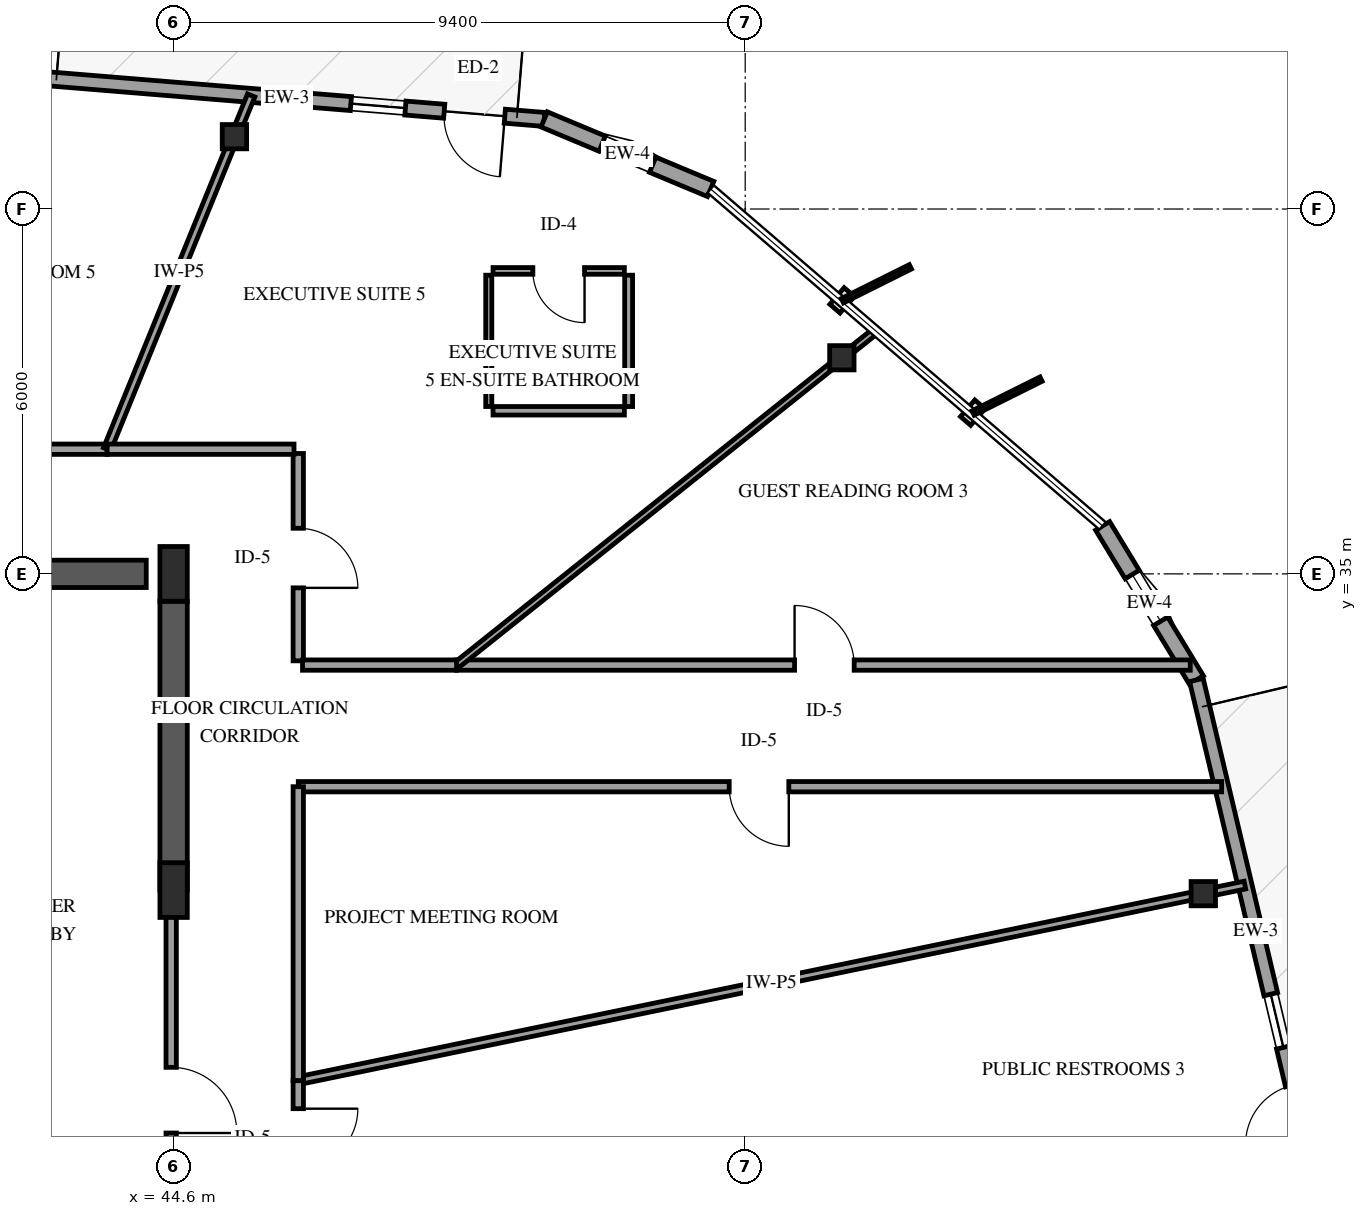
"""IFC4 building model, lengths in metres.
Left out: names, types, materials, properties, quantities, classifications, styles, units other than length and angle.
Written with IfcOpenShell. Run it as: python <this file> out.ifc"""

import sys

from ifc_helpers import new_model, si_unit, direction, frame, frame_2d, origin, origin_2d, place, context, subcontext, project, spatial, rectangle, i_section, extrude, element, fill, save


model = new_model("IFC4")
c1 = context("Model", 3, precision=1e-05, world=origin(), true_north=direction((0.0, 1.0)))
c2 = subcontext(c1, "Body", "Model", "MODEL_VIEW")
j1 = project(units=[si_unit("LENGTHUNIT", "METRE"), si_unit("PLANEANGLEUNIT", "RADIAN")], contexts=[c1])
p1 = place(None, origin())
s1 = spatial("IfcSite", under=j1, at=p1, CompositionType="ELEMENT")
p2 = place(p1, origin())
s2 = spatial("IfcBuilding", under=s1, at=p2, CompositionType="ELEMENT")
p3 = place(p2, frame((0.0, 0.0, 280.0)))
s3 = spatial("IfcBuildingStorey", under=s2, at=p3, CompositionType="ELEMENT", Elevation=280.0)
p4 = place(p3, frame((41.3, 35.0, 0.0), z_axis=(0.0, 0.0, 1.0), x_axis=(1.0, 0.0, 0.0)))
e1 = element("IfcWall", 1, at=p4, inside=s3, PredefinedType="SHEAR", context=c2, shape_type="SweptSolid", body=[
    extrude(rectangle(XDim=2.85, YDim=0.45, at=frame_2d((1.425, 0.0))), origin(), (0.0, 0.0, 1.0), 3.75),
])
p5 = place(p3, frame((44.6, 29.8, 0.0), z_axis=(0.0, 0.0, 1.0), x_axis=(0.0, 1.0, 0.0)))
e2 = element("IfcWall", 2, at=p5, inside=s3, PredefinedType="SHEAR", context=c2, shape_type="SweptSolid", body=[
    extrude(rectangle(XDim=4.75, YDim=0.45, at=frame_2d((2.375, 0.0))), origin(), (0.0, 0.0, 1.0), 3.75),
])
for number, where, z_axis, x_axis in (
    (3, (44.6, 29.8, 0.0), (0.0, 0.0, 1.0), (1.0, 0.0, 0.0)),
    (4, (44.6, 35.0, 0.0), (0.0, 0.0, 1.0), (1.0, 0.0, 0.0)),
):
    element("IfcColumn", number, at=place(p3, frame(where, z_axis=z_axis, x_axis=x_axis)), inside=s3, PredefinedType="PILASTER", context=c2, shape_type="SweptSolid", body=[
        extrude(rectangle(XDim=0.45, YDim=0.9, at=origin_2d()), origin(), (0.0, 0.0, 1.0), 3.75),
    ])
for number, where, z_axis, x_axis in (
    (5, (61.534, 29.741, 0.0), (0.0, 0.0, 1.0), (1.0, 0.0, 0.0)),
    (6, (55.589, 38.554, 0.0), (0.0, 0.0, 1.0), (1.0, 0.0, 0.0)),
    (7, (45.6, 42.189, 0.0), (0.0, 0.0, 1.0), (1.0, 0.0, 0.0)),
):
    element("IfcColumn", number, at=place(p3, frame(where, z_axis=z_axis, x_axis=x_axis)), inside=s3, PredefinedType="COLUMN", context=c2, shape_type="SweptSolid", body=[
        extrude(i_section(OverallWidth=0.401, OverallDepth=0.399, WebThickness=0.025, FlangeThickness=0.04, FilletRadius=0.038, at=origin_2d()), origin(), (0.0, 0.0, 1.0), 3.75),
    ])
p6 = place(p3, frame((50.695, 42.473, 0.0), z_axis=(0.0, 0.0, 1.0), x_axis=(-0.996664954759, 0.081602499682, 0.0)))
e8 = element("IfcWall", 8, at=p6, inside=s3, PredefinedType="SOLIDWALL", context=c2, shape_type="SweptSolid", body=[
    extrude(rectangle(XDim=8.5, YDim=0.23, at=frame_2d((4.25, 0.0))), origin(), (0.0, 0.0, 1.0), 2.789),
])
p7 = place(p6, frame((0.65, 0.0, 0.0)))
e9 = element("IfcOpeningElement", 9, at=p7, cuts=e8, PredefinedType="OPENING", context=c2, shape_type="SweptSolid", body=[
    extrude(rectangle(XDim=1.0, YDim=2.15, at=frame_2d((0.5, 1.075))), frame((0.0, 0.125, 0.0), z_axis=(0.0, -1.0, 0.0), x_axis=(1.0, 0.0, 0.0)), (0.0, 0.0, 1.0), 0.25),
])
p8 = place(p6, frame((2.29, 0.0, 0.72)))
e10 = element("IfcOpeningElement", 10, at=p8, cuts=e8, PredefinedType="OPENING", context=c2, shape_type="SweptSolid", body=[
    extrude(rectangle(XDim=0.9, YDim=1.5, at=frame_2d((0.45, 0.75))), frame((0.0, 0.125, 0.0), z_axis=(0.0, -1.0, 0.0), x_axis=(1.0, 0.0, 0.0)), (0.0, 0.0, 1.0), 0.25),
])
p9 = place(p3, frame((61.42, 33.255, 0.0), z_axis=(0.0, 0.0, 1.0), x_axis=(-0.51977462781, 0.854303421675, 0.0)))
e11 = element("IfcWall", 11, at=p9, inside=s3, PredefinedType="SOLIDWALL", context=c2, shape_type="SweptSolid", body=[
    extrude(rectangle(XDim=2.967, YDim=0.27, at=frame_2d((1.483, 0.0))), origin(), (0.0, 0.0, 1.0), 2.789),
])
p10 = place(p9, frame((1.131, 0.0, 0.75)))
e12 = element("IfcOpeningElement", 12, at=p10, cuts=e11, PredefinedType="OPENING", context=c2, shape_type="SweptSolid", body=[
    extrude(rectangle(XDim=0.9, YDim=1.5, at=frame_2d((0.45, 0.75))), frame((0.0, 0.145, 0.0), z_axis=(0.0, -1.0, 0.0), x_axis=(1.0, 0.0, 0.0)), (0.0, 0.0, 1.0), 0.29),
])
p11 = place(p3, frame((63.378, 24.984, 0.0), z_axis=(0.0, 0.0, 1.0), x_axis=(-0.230391946718, 0.973097914337, 0.0)))
e13 = element("IfcWall", 13, at=p11, inside=s3, PredefinedType="SOLIDWALL", context=c2, shape_type="SweptSolid", body=[
    extrude(rectangle(XDim=8.5, YDim=0.23, at=frame_2d((4.25, 0.0))), origin(), (0.0, 0.0, 1.0), 2.789),
])
p12 = place(p11, frame((0.65, 0.0, 0.0)))
e14 = element("IfcOpeningElement", 14, at=p12, cuts=e13, PredefinedType="OPENING", context=c2, shape_type="SweptSolid", body=[
    extrude(rectangle(XDim=1.0, YDim=2.15, at=frame_2d((0.5, 1.075))), frame((0.0, 0.125, 0.0), z_axis=(0.0, -1.0, 0.0), x_axis=(1.0, 0.0, 0.0)), (0.0, 0.0, 1.0), 0.25),
])
p13 = place(p11, frame((2.29, 0.0, 0.72)))
e15 = element("IfcOpeningElement", 15, at=p13, cuts=e13, PredefinedType="OPENING", context=c2, shape_type="SweptSolid", body=[
    extrude(rectangle(XDim=0.9, YDim=1.5, at=frame_2d((0.45, 0.75))), frame((0.0, 0.125, 0.0), z_axis=(0.0, -1.0, 0.0), x_axis=(1.0, 0.0, 0.0)), (0.0, 0.0, 1.0), 0.25),
])
p14 = place(p3, frame((53.432, 41.33, 0.0), z_axis=(0.0, 0.0, 1.0), x_axis=(-0.922674655035, 0.385579409405, 0.0)))
e16 = element("IfcWall", 16, at=p14, inside=s3, PredefinedType="SOLIDWALL", context=c2, shape_type="SweptSolid", body=[
    extrude(rectangle(XDim=2.967, YDim=0.27, at=frame_2d((1.483, 0.0))), origin(), (0.0, 0.0, 1.0), 2.789),
])
p15 = place(p14, frame((1.033, 0.0, 0.75)))
e17 = element("IfcOpeningElement", 17, at=p15, cuts=e16, PredefinedType="OPENING", context=c2, shape_type="SweptSolid", body=[
    extrude(rectangle(XDim=0.9, YDim=1.5, at=frame_2d((0.45, 0.75))), frame((0.0, 0.145, 0.0), z_axis=(0.0, -1.0, 0.0), x_axis=(1.0, 0.0, 0.0)), (0.0, 0.0, 1.0), 0.29),
])
p16 = place(p3, frame((46.65, 26.665, 0.0), z_axis=(0.0, 0.0, 1.0), x_axis=(0.97930966803, 0.202367423521, 0.0)))
e18 = element("IfcWall", 18, at=p16, inside=s3, PredefinedType="PARTITIONING", context=c2, shape_type="SweptSolid", body=[
    extrude(rectangle(XDim=15.897, YDim=0.13, at=frame_2d((7.948, 0.0))), origin(), (0.0, 0.0, 1.0), 2.705),
])
p17 = place(p3, frame((61.835, 31.5, 0.0), z_axis=(0.0, 0.0, 1.0), x_axis=(-1.0, 0.0, 0.0)))
e19 = element("IfcWall", 19, at=p17, inside=s3, PredefinedType="PARTITIONING", context=c2, shape_type="SweptSolid", body=[
    extrude(rectangle(XDim=15.185, YDim=0.17, at=frame_2d((7.593, 0.0))), origin(), (0.0, 0.0, 1.0), 3.41),
])
p18 = place(p17, frame((7.118, 0.0, 0.0)))
e20 = element("IfcOpeningElement", 20, at=p18, cuts=e19, PredefinedType="OPENING", context=c2, shape_type="SweptSolid", body=[
    extrude(rectangle(XDim=0.98, YDim=2.15, at=frame_2d((0.49, 1.075))), frame((0.0, 0.095, 0.0), z_axis=(0.0, -1.0, 0.0), x_axis=(1.0, 0.0, 0.0)), (0.0, 0.0, 1.0), 0.19),
])
p19 = place(p3, frame((30.903, 37.05, 0.0), z_axis=(0.0, 0.0, 1.0), x_axis=(1.0, 0.0, 0.0)))
e21 = element("IfcWall", 21, at=p19, inside=s3, PredefinedType="PARTITIONING", context=c2, shape_type="SweptSolid", body=[
    extrude(rectangle(XDim=12.604, YDim=0.17, at=frame_2d((6.302, 0.0))), origin(), (0.0, 0.0, 1.0), 3.41),
])
p20 = place(p19, frame((5.827, 0.0, 0.0)))
e22 = element("IfcOpeningElement", 22, at=p20, cuts=e21, PredefinedType="OPENING", context=c2, shape_type="SweptSolid", body=[
    extrude(rectangle(XDim=0.98, YDim=2.15, at=frame_2d((0.49, 1.075))), frame((0.0, 0.095, 0.0), z_axis=(0.0, -1.0, 0.0), x_axis=(1.0, 0.0, 0.0)), (0.0, 0.0, 1.0), 0.19),
])
p21 = place(p3, frame((49.254, 33.5, 0.0), z_axis=(0.0, 0.0, 1.0), x_axis=(1.0, 0.0, 0.0)))
e23 = element("IfcWall", 23, at=p21, inside=s3, PredefinedType="PARTITIONING", context=c2, shape_type="SweptSolid", body=[
    extrude(rectangle(XDim=12.065, YDim=0.17, at=frame_2d((6.033, 0.0))), origin(), (0.0, 0.0, 1.0), 2.788),
])
p22 = place(p21, frame((5.558, 0.0, 0.0)))
e24 = element("IfcOpeningElement", 24, at=p22, cuts=e23, PredefinedType="OPENING", context=c2, shape_type="SweptSolid", body=[
    extrude(rectangle(XDim=0.98, YDim=2.15, at=frame_2d((0.49, 1.075))), frame((0.0, 0.095, 0.0), z_axis=(0.0, -1.0, 0.0), x_axis=(1.0, 0.0, 0.0)), (0.0, 0.0, 1.0), 0.19),
])
p23 = place(p3, frame((49.254, 33.5, 0.0), z_axis=(0.0, 0.0, 1.0), x_axis=(0.781743502195, 0.623600109666, 0.0)))
e25 = element("IfcWall", 25, at=p23, inside=s3, PredefinedType="PARTITIONING", context=c2, shape_type="SweptSolid", body=[
    extrude(rectangle(XDim=8.815, YDim=0.11, at=frame_2d((4.407, 0.0))), origin(), (0.0, 0.0, 1.0), 3.41),
])
p24 = place(p3, frame((44.56, 29.8, 0.0), z_axis=(0.0, 0.0, 1.0), x_axis=(0.0, -1.0, 0.0)))
e26 = element("IfcWall", 26, at=p24, inside=s3, PredefinedType="PARTITIONING", context=c2, shape_type="SweptSolid", body=[
    extrude(rectangle(XDim=6.91, YDim=0.17, at=frame_2d((3.455, 0.0))), origin(), (0.0, 0.0, 1.0), 2.45),
])
p25 = place(p24, frame((2.915, 0.0, 0.0)))
e27 = element("IfcOpeningElement", 27, at=p25, cuts=e26, PredefinedType="OPENING", context=c2, shape_type="SweptSolid", body=[
    extrude(rectangle(XDim=1.08, YDim=2.15, at=frame_2d((0.54, 1.075))), frame((0.0, 0.095, 0.0), z_axis=(0.0, -1.0, 0.0), x_axis=(1.0, 0.0, 0.0)), (0.0, 0.0, 1.0), 0.19),
])
p26 = place(p3, frame((43.507, 37.05, 0.0), z_axis=(0.0, 0.0, 1.0), x_axis=(0.377112931265, 0.926167283525, 0.0)))
e28 = element("IfcWall", 28, at=p26, inside=s3, PredefinedType="PARTITIONING", context=c2, shape_type="SweptSolid", body=[
    extrude(rectangle(XDim=6.282, YDim=0.13, at=frame_2d((3.141, 0.0))), origin(), (0.0, 0.0, 1.0), 2.705),
])
p27 = place(p3, frame((46.65, 31.5, 0.0), z_axis=(0.0, 0.0, 1.0), x_axis=(0.0, -1.0, 0.0)))
e29 = element("IfcWall", 29, at=p27, inside=s3, PredefinedType="PARTITIONING", context=c2, shape_type="SweptSolid", body=[
    extrude(rectangle(XDim=4.835, YDim=0.17, at=frame_2d((2.417, 0.0))), origin(), (0.0, 0.0, 1.0), 3.41),
])
p28 = place(p3, frame((46.65, 36.98, 0.0), z_axis=(0.0, 0.0, 1.0), x_axis=(0.0, -1.0, 0.0)))
e30 = element("IfcWall", 30, at=p28, inside=s3, PredefinedType="PARTITIONING", context=c2, shape_type="SweptSolid", body=[
    extrude(rectangle(XDim=3.41, YDim=0.17, at=frame_2d((1.705, 0.0))), origin(), (0.0, 0.0, 1.0), 3.41),
])
p29 = place(p28, frame((1.23, 0.0, 0.0)))
e31 = element("IfcOpeningElement", 31, at=p29, cuts=e30, PredefinedType="OPENING", context=c2, shape_type="SweptSolid", body=[
    extrude(rectangle(XDim=0.98, YDim=2.15, at=frame_2d((0.49, 1.075))), frame((0.0, 0.095, 0.0), z_axis=(0.0, -1.0, 0.0), x_axis=(1.0, 0.0, 0.0)), (0.0, 0.0, 1.0), 0.19),
])
p30 = place(p3, frame((43.507, 37.05, 0.0), z_axis=(0.0, 0.0, 1.0), x_axis=(1.0, 0.0, 0.0)))
e32 = element("IfcWall", 32, at=p30, inside=s3, PredefinedType="PARTITIONING", context=c2, shape_type="SweptSolid", body=[
    extrude(rectangle(XDim=3.073, YDim=0.17, at=frame_2d((1.537, 0.0))), origin(), (0.0, 0.0, 1.0), 3.41),
])
p31 = place(p3, frame((46.72, 33.5, 0.0), z_axis=(0.0, 0.0, 1.0), x_axis=(1.0, 0.0, 0.0)))
e33 = element("IfcWall", 33, at=p31, inside=s3, PredefinedType="PARTITIONING", context=c2, shape_type="SweptSolid", body=[
    extrude(rectangle(XDim=2.534, YDim=0.17, at=frame_2d((1.267, 0.0))), origin(), (0.0, 0.0, 1.0), 2.788),
])
p32 = place(p3, frame((52.013, 39.982, 0.0), z_axis=(0.0, 0.0, 1.0), x_axis=(-1.0, 0.0, 0.0)))
e34 = element("IfcWall", 34, at=p32, inside=s3, PredefinedType="PARTITIONING", context=c2, shape_type="SweptSolid", body=[
    extrude(rectangle(XDim=2.16, YDim=0.11, at=frame_2d((1.08, 0.0))), origin(), (0.0, 0.0, 1.0), 3.41),
])
p33 = place(p32, frame((0.655, 0.0, 0.0)))
e35 = element("IfcOpeningElement", 35, at=p33, cuts=e34, PredefinedType="OPENING", context=c2, shape_type="SweptSolid", body=[
    extrude(rectangle(XDim=0.85, YDim=2.1, at=frame_2d((0.425, 1.05))), frame((0.0, 0.065, 0.0), z_axis=(0.0, -1.0, 0.0), x_axis=(1.0, 0.0, 0.0)), (0.0, 0.0, 1.0), 0.13),
])
p34 = place(p3, frame((49.783, 39.912, 0.0), z_axis=(0.0, 0.0, 1.0), x_axis=(0.0, -1.0, 0.0)))
e36 = element("IfcWall", 36, at=p34, inside=s3, PredefinedType="PARTITIONING", context=c2, shape_type="SweptSolid", body=[
    extrude(rectangle(XDim=2.16, YDim=0.1, at=frame_2d((1.08, 0.0))), origin(), (0.0, 0.0, 1.0), 3.41),
])
p35 = place(p3, frame((49.853, 37.682, 0.0), z_axis=(0.0, 0.0, 1.0), x_axis=(1.0, 0.0, 0.0)))
e37 = element("IfcWall", 37, at=p35, inside=s3, PredefinedType="PARTITIONING", context=c2, shape_type="SweptSolid", body=[
    extrude(rectangle(XDim=2.16, YDim=0.14, at=frame_2d((1.08, 0.0))), origin(), (0.0, 0.0, 1.0), 3.41),
])
p36 = place(p3, frame((52.083, 37.752, 0.0), z_axis=(0.0, 0.0, 1.0), x_axis=(0.0, 1.0, 0.0)))
e38 = element("IfcWall", 38, at=p36, inside=s3, PredefinedType="PARTITIONING", context=c2, shape_type="SweptSolid", body=[
    extrude(rectangle(XDim=2.16, YDim=0.13, at=frame_2d((1.08, 0.0))), origin(), (0.0, 0.0, 1.0), 3.41),
])
p37 = place(p3, frame((46.65, 26.665, 0.0), z_axis=(0.0, 0.0, 1.0), x_axis=(0.0, -1.0, 0.0)))
e39 = element("IfcWall", 39, at=p37, inside=s3, PredefinedType="PARTITIONING", context=c2, shape_type="SweptSolid", body=[
    extrude(rectangle(XDim=1.871, YDim=0.17, at=frame_2d((0.936, 0.0))), origin(), (0.0, 0.0, 1.0), 3.41),
])
p38 = place(p37, frame((0.46, 0.0, 0.0)))
e40 = element("IfcOpeningElement", 40, at=p38, cuts=e39, PredefinedType="OPENING", context=c2, shape_type="SweptSolid", body=[
    extrude(rectangle(XDim=0.98, YDim=2.15, at=frame_2d((0.49, 1.075))), frame((0.0, 0.095, 0.0), z_axis=(0.0, -1.0, 0.0), x_axis=(1.0, 0.0, 0.0)), (0.0, 0.0, 1.0), 0.19),
])
p39 = place(p7, origin())
e41 = element("IfcDoor", 41, at=p39, inside=s3, OperationType="SINGLE_SWING_LEFT", PredefinedType="DOOR", context=c2, shape_type="SweptSolid", body=[
    extrude(rectangle(XDim=1.0, YDim=2.15, at=frame_2d((0.5, 1.075))), frame((0.0, 0.025, 0.0), z_axis=(0.0, -1.0, 0.0), x_axis=(1.0, 0.0, 0.0)), (0.0, 0.0, 1.0), 0.05),
])
fill(e9, e41)
p40 = place(p8, origin())
e42 = element("IfcWindow", 42, at=p40, inside=s3, PartitioningType="SINGLE_PANEL", PredefinedType="WINDOW", context=c2, shape_type="SweptSolid", body=[
    extrude(rectangle(XDim=0.9, YDim=1.5, at=frame_2d((0.45, 0.75))), frame((0.0, 0.03, 0.0), z_axis=(0.0, -1.0, 0.0), x_axis=(1.0, 0.0, 0.0)), (0.0, 0.0, 1.0), 0.06),
])
fill(e10, e42)
p41 = place(p10, origin())
e43 = element("IfcWindow", 43, at=p41, inside=s3, PartitioningType="SINGLE_PANEL", PredefinedType="WINDOW", context=c2, shape_type="SweptSolid", body=[
    extrude(rectangle(XDim=0.9, YDim=1.5, at=frame_2d((0.45, 0.75))), frame((0.0, 0.03, 0.0), z_axis=(0.0, -1.0, 0.0), x_axis=(1.0, 0.0, 0.0)), (0.0, 0.0, 1.0), 0.06),
])
fill(e12, e43)
p42 = place(p13, origin())
e44 = element("IfcWindow", 44, at=p42, inside=s3, PartitioningType="SINGLE_PANEL", PredefinedType="WINDOW", context=c2, shape_type="SweptSolid", body=[
    extrude(rectangle(XDim=0.9, YDim=1.5, at=frame_2d((0.45, 0.75))), frame((0.0, 0.03, 0.0), z_axis=(0.0, -1.0, 0.0), x_axis=(1.0, 0.0, 0.0)), (0.0, 0.0, 1.0), 0.06),
])
fill(e15, e44)
p43 = place(p15, origin())
e45 = element("IfcWindow", 45, at=p43, inside=s3, PartitioningType="SINGLE_PANEL", PredefinedType="WINDOW", context=c2, shape_type="SweptSolid", body=[
    extrude(rectangle(XDim=0.9, YDim=1.5, at=frame_2d((0.45, 0.75))), frame((0.0, 0.03, 0.0), z_axis=(0.0, -1.0, 0.0), x_axis=(1.0, 0.0, 0.0)), (0.0, 0.0, 1.0), 0.06),
])
fill(e17, e45)
p44 = place(p18, origin())
e46 = element("IfcDoor", 46, at=p44, inside=s3, OperationType="SINGLE_SWING_LEFT", PredefinedType="DOOR", context=c2, shape_type="SweptSolid", body=[
    extrude(rectangle(XDim=0.98, YDim=2.15, at=frame_2d((0.49, 1.075))), frame((0.0, 0.025, 0.0), z_axis=(0.0, -1.0, 0.0), x_axis=(1.0, 0.0, 0.0)), (0.0, 0.0, 1.0), 0.05),
])
fill(e20, e46)
p45 = place(p22, origin())
e47 = element("IfcDoor", 47, at=p45, inside=s3, OperationType="SINGLE_SWING_LEFT", PredefinedType="DOOR", context=c2, shape_type="SweptSolid", body=[
    extrude(rectangle(XDim=0.98, YDim=2.15, at=frame_2d((0.49, 1.075))), frame((0.0, 0.025, 0.0), z_axis=(0.0, -1.0, 0.0), x_axis=(1.0, 0.0, 0.0)), (0.0, 0.0, 1.0), 0.05),
])
fill(e24, e47)
p46 = place(p25, origin())
e48 = element("IfcDoor", 48, at=p46, inside=s3, OperationType="SINGLE_SWING_RIGHT", PredefinedType="DOOR", context=c2, shape_type="SweptSolid", body=[
    extrude(rectangle(XDim=1.08, YDim=2.15, at=frame_2d((0.54, 1.075))), frame((0.0, 0.025, 0.0), z_axis=(0.0, -1.0, 0.0), x_axis=(1.0, 0.0, 0.0)), (0.0, 0.0, 1.0), 0.05),
])
fill(e27, e48)
p47 = place(p29, origin())
e49 = element("IfcDoor", 49, at=p47, inside=s3, OperationType="SINGLE_SWING_RIGHT", PredefinedType="DOOR", context=c2, shape_type="SweptSolid", body=[
    extrude(rectangle(XDim=0.98, YDim=2.15, at=frame_2d((0.49, 1.075))), frame((0.0, 0.025, 0.0), z_axis=(0.0, -1.0, 0.0), x_axis=(1.0, 0.0, 0.0)), (0.0, 0.0, 1.0), 0.05),
])
fill(e31, e49)
p48 = place(p33, origin())
e50 = element("IfcDoor", 50, at=p48, inside=s3, OperationType="SINGLE_SWING_LEFT", PredefinedType="DOOR", context=c2, shape_type="SweptSolid", body=[
    extrude(rectangle(XDim=0.85, YDim=2.1, at=frame_2d((0.425, 1.05))), frame((0.0, 0.025, 0.0), z_axis=(0.0, -1.0, 0.0), x_axis=(1.0, 0.0, 0.0)), (0.0, 0.0, 1.0), 0.05),
])
fill(e35, e50)
p49 = place(p38, origin())
e51 = element("IfcDoor", 51, at=p49, inside=s3, OperationType="SINGLE_SWING_LEFT", PredefinedType="DOOR", context=c2, shape_type="SweptSolid", body=[
    extrude(rectangle(XDim=0.98, YDim=2.15, at=frame_2d((0.49, 1.075))), frame((0.0, 0.025, 0.0), z_axis=(0.0, -1.0, 0.0), x_axis=(1.0, 0.0, 0.0)), (0.0, 0.0, 1.0), 0.05),
])
fill(e40, e51)
save(model, sys.argv[1])
